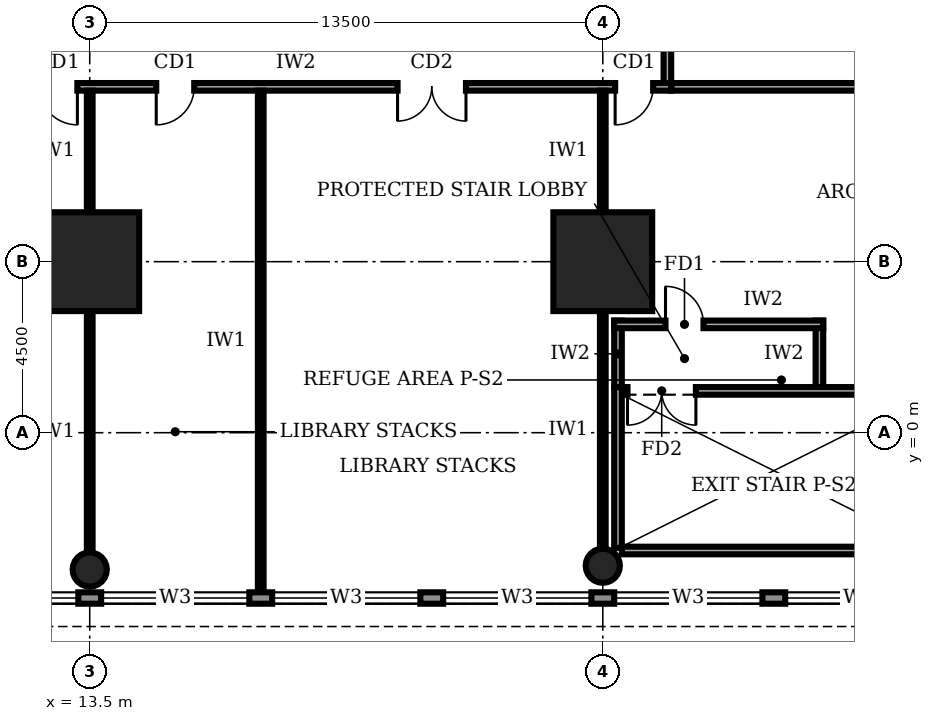
"""IFC4 building model, lengths in metres.
Left out: names, types, materials, properties, quantities, classifications, styles, units other than length and angle.
Written with IfcOpenShell. Run it as: python <this file> out.ifc"""

import sys

from ifc_helpers import new_model, si_unit, direction, frame, frame_2d, origin, origin_2d, place, context, subcontext, project, spatial, rectangle, circle, extrude, element, fill, save


model = new_model("IFC4")
c1 = context("Model", 3, precision=1e-05, world=origin(), true_north=direction((0.0, 1.0)))
c2 = subcontext(c1, "Body", "Model", "MODEL_VIEW")
j1 = project(units=[si_unit("LENGTHUNIT", "METRE"), si_unit("PLANEANGLEUNIT", "RADIAN")], contexts=[c1])
p1 = place(None, origin())
s1 = spatial("IfcSite", under=j1, at=p1, CompositionType="ELEMENT")
p2 = place(p1, origin())
s2 = spatial("IfcBuilding", under=s1, at=p2, CompositionType="ELEMENT")
p3 = place(p2, frame((0.0, 0.0, 16.0)))
s3 = spatial("IfcBuildingStorey", under=s2, at=p3, CompositionType="ELEMENT", Elevation=16.0)
for number, where, z_axis, x_axis in (
    (1, (13.5, 4.5, 0.0), (0.0, 0.0, 1.0), (1.0, 0.0, 0.0)),
    (2, (27.0, 4.5, 0.0), (0.0, 0.0, 1.0), (1.0, 0.0, 0.0)),
):
    element("IfcColumn", number, at=place(p3, frame(where, z_axis=z_axis, x_axis=x_axis)), inside=s3, PredefinedType="COLUMN", context=c2, shape_type="SweptSolid", body=[
        extrude(rectangle(XDim=2.6, YDim=2.6, at=origin_2d()), origin(), (0.0, 0.0, 1.0), 5.0),
    ])
for number, where, z_axis, x_axis in (
    (3, (13.5, -3.6, 0.0), (0.0, 0.0, 1.0), (1.0, 0.0, 0.0)),
    (4, (27.0, -3.5, 0.0), (0.0, 0.0, 1.0), (1.0, 0.0, 0.0)),
):
    element("IfcColumn", number, at=place(p3, frame(where, z_axis=z_axis, x_axis=x_axis)), inside=s3, PredefinedType="COLUMN", context=c2, shape_type="SweptSolid", body=[
        extrude(circle(Radius=0.45, at=origin_2d()), origin(), (0.0, 0.0, 1.0), 5.0),
    ])
p4 = place(p3, frame((0.02, -4.35, 0.0), z_axis=(0.0, 0.0, 1.0), x_axis=(1.0, 0.0, 0.0)))
e5 = element("IfcWall", 5, at=p4, inside=s3, PredefinedType="STANDARD", context=c2, shape_type="SweptSolid", body=[
    extrude(rectangle(XDim=98.96, YDim=0.3, at=frame_2d((49.48, 0.0))), origin(), (0.0, 0.0, 1.0), 4.7),
])
p5 = place(p4, frame((4.78, 0.0, 0.95)))
e6 = element("IfcOpeningElement", 6, at=p5, cuts=e5, PredefinedType="OPENING", context=c2, shape_type="SweptSolid", body=[
    extrude(rectangle(XDim=3.9, YDim=1.8, at=frame_2d((1.95, 0.9))), frame((0.0, 0.16, 0.0), z_axis=(0.0, -1.0, 0.0), x_axis=(1.0, 0.0, 0.0)), (0.0, 0.0, 1.0), 0.32),
])
p6 = place(p4, frame((9.28, 0.0, 0.95)))
e7 = element("IfcOpeningElement", 7, at=p6, cuts=e5, PredefinedType="OPENING", context=c2, shape_type="SweptSolid", body=[
    extrude(rectangle(XDim=3.9, YDim=1.8, at=frame_2d((1.95, 0.9))), frame((0.0, 0.16, 0.0), z_axis=(0.0, -1.0, 0.0), x_axis=(1.0, 0.0, 0.0)), (0.0, 0.0, 1.0), 0.32),
])
p7 = place(p4, frame((13.78, 0.0, 0.95)))
e8 = element("IfcOpeningElement", 8, at=p7, cuts=e5, PredefinedType="OPENING", context=c2, shape_type="SweptSolid", body=[
    extrude(rectangle(XDim=3.9, YDim=1.8, at=frame_2d((1.95, 0.9))), frame((0.0, 0.16, 0.0), z_axis=(0.0, -1.0, 0.0), x_axis=(1.0, 0.0, 0.0)), (0.0, 0.0, 1.0), 0.32),
])
p8 = place(p4, frame((18.28, 0.0, 0.95)))
e9 = element("IfcOpeningElement", 9, at=p8, cuts=e5, PredefinedType="OPENING", context=c2, shape_type="SweptSolid", body=[
    extrude(rectangle(XDim=3.9, YDim=1.8, at=frame_2d((1.95, 0.9))), frame((0.0, 0.16, 0.0), z_axis=(0.0, -1.0, 0.0), x_axis=(1.0, 0.0, 0.0)), (0.0, 0.0, 1.0), 0.32),
])
p9 = place(p4, frame((22.78, 0.0, 0.95)))
e10 = element("IfcOpeningElement", 10, at=p9, cuts=e5, PredefinedType="OPENING", context=c2, shape_type="SweptSolid", body=[
    extrude(rectangle(XDim=3.9, YDim=1.8, at=frame_2d((1.95, 0.9))), frame((0.0, 0.16, 0.0), z_axis=(0.0, -1.0, 0.0), x_axis=(1.0, 0.0, 0.0)), (0.0, 0.0, 1.0), 0.32),
])
p10 = place(p4, frame((27.28, 0.0, 0.95)))
e11 = element("IfcOpeningElement", 11, at=p10, cuts=e5, PredefinedType="OPENING", context=c2, shape_type="SweptSolid", body=[
    extrude(rectangle(XDim=3.9, YDim=1.8, at=frame_2d((1.95, 0.9))), frame((0.0, 0.16, 0.0), z_axis=(0.0, -1.0, 0.0), x_axis=(1.0, 0.0, 0.0)), (0.0, 0.0, 1.0), 0.32),
])
p11 = place(p4, frame((31.78, 0.0, 0.95)))
e12 = element("IfcOpeningElement", 12, at=p11, cuts=e5, PredefinedType="OPENING", context=c2, shape_type="SweptSolid", body=[
    extrude(rectangle(XDim=3.9, YDim=1.8, at=frame_2d((1.95, 0.9))), frame((0.0, 0.16, 0.0), z_axis=(0.0, -1.0, 0.0), x_axis=(1.0, 0.0, 0.0)), (0.0, 0.0, 1.0), 0.32),
])
p12 = place(p4, frame((36.28, 0.0, 0.95)))
e13 = element("IfcOpeningElement", 13, at=p12, cuts=e5, PredefinedType="OPENING", context=c2, shape_type="SweptSolid", body=[
    extrude(rectangle(XDim=3.9, YDim=1.8, at=frame_2d((1.95, 0.9))), frame((0.0, 0.16, 0.0), z_axis=(0.0, -1.0, 0.0), x_axis=(1.0, 0.0, 0.0)), (0.0, 0.0, 1.0), 0.32),
])
p13 = place(p4, frame((40.78, 0.0, 0.95)))
e14 = element("IfcOpeningElement", 14, at=p13, cuts=e5, PredefinedType="OPENING", context=c2, shape_type="SweptSolid", body=[
    extrude(rectangle(XDim=3.9, YDim=1.8, at=frame_2d((1.95, 0.9))), frame((0.0, 0.16, 0.0), z_axis=(0.0, -1.0, 0.0), x_axis=(1.0, 0.0, 0.0)), (0.0, 0.0, 1.0), 0.32),
])
p14 = place(p4, frame((45.28, 0.0, 0.95)))
e15 = element("IfcOpeningElement", 15, at=p14, cuts=e5, PredefinedType="OPENING", context=c2, shape_type="SweptSolid", body=[
    extrude(rectangle(XDim=3.9, YDim=1.8, at=frame_2d((1.95, 0.9))), frame((0.0, 0.16, 0.0), z_axis=(0.0, -1.0, 0.0), x_axis=(1.0, 0.0, 0.0)), (0.0, 0.0, 1.0), 0.32),
])
p15 = place(p4, frame((49.78, 0.0, 0.95)))
e16 = element("IfcOpeningElement", 16, at=p15, cuts=e5, PredefinedType="OPENING", context=c2, shape_type="SweptSolid", body=[
    extrude(rectangle(XDim=3.9, YDim=1.8, at=frame_2d((1.95, 0.9))), frame((0.0, 0.16, 0.0), z_axis=(0.0, -1.0, 0.0), x_axis=(1.0, 0.0, 0.0)), (0.0, 0.0, 1.0), 0.32),
])
p16 = place(p4, frame((54.28, 0.0, 0.95)))
e17 = element("IfcOpeningElement", 17, at=p16, cuts=e5, PredefinedType="OPENING", context=c2, shape_type="SweptSolid", body=[
    extrude(rectangle(XDim=3.9, YDim=1.8, at=frame_2d((1.95, 0.9))), frame((0.0, 0.16, 0.0), z_axis=(0.0, -1.0, 0.0), x_axis=(1.0, 0.0, 0.0)), (0.0, 0.0, 1.0), 0.32),
])
p17 = place(p4, frame((58.78, 0.0, 0.95)))
e18 = element("IfcOpeningElement", 18, at=p17, cuts=e5, PredefinedType="OPENING", context=c2, shape_type="SweptSolid", body=[
    extrude(rectangle(XDim=3.9, YDim=1.8, at=frame_2d((1.95, 0.9))), frame((0.0, 0.16, 0.0), z_axis=(0.0, -1.0, 0.0), x_axis=(1.0, 0.0, 0.0)), (0.0, 0.0, 1.0), 0.32),
])
p18 = place(p4, frame((63.28, 0.0, 0.95)))
e19 = element("IfcOpeningElement", 19, at=p18, cuts=e5, PredefinedType="OPENING", context=c2, shape_type="SweptSolid", body=[
    extrude(rectangle(XDim=3.9, YDim=1.8, at=frame_2d((1.95, 0.9))), frame((0.0, 0.16, 0.0), z_axis=(0.0, -1.0, 0.0), x_axis=(1.0, 0.0, 0.0)), (0.0, 0.0, 1.0), 0.32),
])
p19 = place(p4, frame((67.78, 0.0, 0.95)))
e20 = element("IfcOpeningElement", 20, at=p19, cuts=e5, PredefinedType="OPENING", context=c2, shape_type="SweptSolid", body=[
    extrude(rectangle(XDim=3.9, YDim=1.8, at=frame_2d((1.95, 0.9))), frame((0.0, 0.16, 0.0), z_axis=(0.0, -1.0, 0.0), x_axis=(1.0, 0.0, 0.0)), (0.0, 0.0, 1.0), 0.32),
])
p20 = place(p4, frame((72.28, 0.0, 0.95)))
e21 = element("IfcOpeningElement", 21, at=p20, cuts=e5, PredefinedType="OPENING", context=c2, shape_type="SweptSolid", body=[
    extrude(rectangle(XDim=3.9, YDim=1.8, at=frame_2d((1.95, 0.9))), frame((0.0, 0.16, 0.0), z_axis=(0.0, -1.0, 0.0), x_axis=(1.0, 0.0, 0.0)), (0.0, 0.0, 1.0), 0.32),
])
p21 = place(p4, frame((76.78, 0.0, 0.95)))
e22 = element("IfcOpeningElement", 22, at=p21, cuts=e5, PredefinedType="OPENING", context=c2, shape_type="SweptSolid", body=[
    extrude(rectangle(XDim=3.9, YDim=1.8, at=frame_2d((1.95, 0.9))), frame((0.0, 0.16, 0.0), z_axis=(0.0, -1.0, 0.0), x_axis=(1.0, 0.0, 0.0)), (0.0, 0.0, 1.0), 0.32),
])
p22 = place(p4, frame((81.28, 0.0, 0.95)))
e23 = element("IfcOpeningElement", 23, at=p22, cuts=e5, PredefinedType="OPENING", context=c2, shape_type="SweptSolid", body=[
    extrude(rectangle(XDim=3.9, YDim=1.8, at=frame_2d((1.95, 0.9))), frame((0.0, 0.16, 0.0), z_axis=(0.0, -1.0, 0.0), x_axis=(1.0, 0.0, 0.0)), (0.0, 0.0, 1.0), 0.32),
])
p23 = place(p4, frame((85.78, 0.0, 0.95)))
e24 = element("IfcOpeningElement", 24, at=p23, cuts=e5, PredefinedType="OPENING", context=c2, shape_type="SweptSolid", body=[
    extrude(rectangle(XDim=3.9, YDim=1.8, at=frame_2d((1.95, 0.9))), frame((0.0, 0.16, 0.0), z_axis=(0.0, -1.0, 0.0), x_axis=(1.0, 0.0, 0.0)), (0.0, 0.0, 1.0), 0.32),
])
p24 = place(p4, frame((90.28, 0.0, 0.95)))
e25 = element("IfcOpeningElement", 25, at=p24, cuts=e5, PredefinedType="OPENING", context=c2, shape_type="SweptSolid", body=[
    extrude(rectangle(XDim=3.9, YDim=1.8, at=frame_2d((1.95, 0.9))), frame((0.0, 0.16, 0.0), z_axis=(0.0, -1.0, 0.0), x_axis=(1.0, 0.0, 0.0)), (0.0, 0.0, 1.0), 0.32),
])
p25 = place(p4, frame((94.78, 0.0, 0.95)))
e26 = element("IfcOpeningElement", 26, at=p25, cuts=e5, PredefinedType="OPENING", context=c2, shape_type="SweptSolid", body=[
    extrude(rectangle(XDim=3.9, YDim=1.8, at=frame_2d((1.95, 0.9))), frame((0.0, 0.16, 0.0), z_axis=(0.0, -1.0, 0.0), x_axis=(1.0, 0.0, 0.0)), (0.0, 0.0, 1.0), 0.32),
])
p26 = place(p3, frame((11.9, 9.1, 0.0), z_axis=(0.0, 0.0, 1.0), x_axis=(1.0, 0.0, 0.0)))
e27 = element("IfcWall", 27, at=p26, inside=s3, PredefinedType="SOLIDWALL", context=c2, shape_type="SweptSolid", body=[
    extrude(rectangle(XDim=16.9, YDim=0.2, at=frame_2d((8.45, 0.0))), origin(), (0.0, 0.0, 1.0), 4.7),
])
p27 = place(p26, frame((0.275, 0.0, 0.0)))
e28 = element("IfcOpeningElement", 28, at=p27, cuts=e27, PredefinedType="OPENING", context=c2, shape_type="SweptSolid", body=[
    extrude(rectangle(XDim=1.0, YDim=2.1, at=frame_2d((0.5, 1.05))), frame((0.0, 0.11, 0.0), z_axis=(0.0, -1.0, 0.0), x_axis=(1.0, 0.0, 0.0)), (0.0, 0.0, 1.0), 0.22),
])
p28 = place(p26, frame((3.35, 0.0, 0.0)))
e29 = element("IfcOpeningElement", 29, at=p28, cuts=e27, PredefinedType="OPENING", context=c2, shape_type="SweptSolid", body=[
    extrude(rectangle(XDim=1.0, YDim=2.1, at=frame_2d((0.5, 1.05))), frame((0.0, 0.11, 0.0), z_axis=(0.0, -1.0, 0.0), x_axis=(1.0, 0.0, 0.0)), (0.0, 0.0, 1.0), 0.22),
])
p29 = place(p26, frame((9.7, 0.0, 0.0)))
e30 = element("IfcOpeningElement", 30, at=p29, cuts=e27, PredefinedType="OPENING", context=c2, shape_type="SweptSolid", body=[
    extrude(rectangle(XDim=1.8, YDim=2.1, at=frame_2d((0.9, 1.05))), frame((0.0, 0.11, 0.0), z_axis=(0.0, -1.0, 0.0), x_axis=(1.0, 0.0, 0.0)), (0.0, 0.0, 1.0), 0.22),
])
p30 = place(p26, frame((15.425, 0.0, 0.0)))
e31 = element("IfcOpeningElement", 31, at=p30, cuts=e27, PredefinedType="OPENING", context=c2, shape_type="SweptSolid", body=[
    extrude(rectangle(XDim=1.0, YDim=2.1, at=frame_2d((0.5, 1.05))), frame((0.0, 0.11, 0.0), z_axis=(0.0, -1.0, 0.0), x_axis=(1.0, 0.0, 0.0)), (0.0, 0.0, 1.0), 0.22),
])
p31 = place(p3, frame((28.7, 9.2, 0.0), z_axis=(0.0, 0.0, 1.0), x_axis=(0.0, 1.0, 0.0)))
e32 = element("IfcWall", 32, at=p31, inside=s3, PredefinedType="SOLIDWALL", context=c2, shape_type="SweptSolid", body=[
    extrude(rectangle(XDim=22.3, YDim=0.2, at=frame_2d((11.15, 0.0))), origin(), (0.0, 0.0, 1.0), 4.7),
])
p32 = place(p31, frame((3.4, 0.0, 0.0)))
e33 = element("IfcOpeningElement", 33, at=p32, cuts=e32, PredefinedType="OPENING", context=c2, shape_type="SweptSolid", body=[
    extrude(rectangle(XDim=1.8, YDim=2.1, at=frame_2d((0.9, 1.05))), frame((0.0, 0.11, 0.0), z_axis=(0.0, -1.0, 0.0), x_axis=(1.0, 0.0, 0.0)), (0.0, 0.0, 1.0), 0.22),
])
p33 = place(p31, frame((14.65, 0.0, 0.0)))
e34 = element("IfcOpeningElement", 34, at=p33, cuts=e32, PredefinedType="OPENING", context=c2, shape_type="SweptSolid", body=[
    extrude(rectangle(XDim=1.8, YDim=2.1, at=frame_2d((0.9, 1.05))), frame((0.0, 0.11, 0.0), z_axis=(0.0, -1.0, 0.0), x_axis=(1.0, 0.0, 0.0)), (0.0, 0.0, 1.0), 0.22),
])
p34 = place(p3, frame((28.8, 9.1, 0.0), z_axis=(0.0, 0.0, 1.0), x_axis=(1.0, 0.0, 0.0)))
e35 = element("IfcWall", 35, at=p34, inside=s3, PredefinedType="SOLIDWALL", context=c2, shape_type="SweptSolid", body=[
    extrude(rectangle(XDim=11.52, YDim=0.2, at=frame_2d((5.76, 0.0))), origin(), (0.0, 0.0, 1.0), 4.7),
])
p35 = place(p3, frame((13.5, -3.13, 0.0), z_axis=(0.0, 0.0, 1.0), x_axis=(0.0, 1.0, 0.0)))
e36 = element("IfcWall", 36, at=p35, inside=s3, PredefinedType="PARTITIONING", context=c2, shape_type="SweptSolid", body=[
    extrude(rectangle(XDim=6.31, YDim=0.15, at=frame_2d((3.155, 0.0))), origin(), (0.0, 0.0, 1.0), 3.7),
])
p36 = place(p3, frame((13.5, 5.82, 0.0), z_axis=(0.0, 0.0, 1.0), x_axis=(0.0, 1.0, 0.0)))
e37 = element("IfcWall", 37, at=p36, inside=s3, PredefinedType="PARTITIONING", context=c2, shape_type="SweptSolid", body=[
    extrude(rectangle(XDim=3.18, YDim=0.15, at=frame_2d((1.59, 0.0))), origin(), (0.0, 0.0, 1.0), 3.8),
])
p37 = place(p3, frame((18.0, -4.2, 0.0), z_axis=(0.0, 0.0, 1.0), x_axis=(0.0, 1.0, 0.0)))
e38 = element("IfcWall", 38, at=p37, inside=s3, PredefinedType="PARTITIONING", context=c2, shape_type="SweptSolid", body=[
    extrude(rectangle(XDim=13.2, YDim=0.15, at=frame_2d((6.6, 0.0))), origin(), (0.0, 0.0, 1.0), 4.7),
])
p38 = place(p3, frame((27.0, -3.03, 0.0), z_axis=(0.0, 0.0, 1.0), x_axis=(0.0, 1.0, 0.0)))
e39 = element("IfcWall", 39, at=p38, inside=s3, PredefinedType="PARTITIONING", context=c2, shape_type="SweptSolid", body=[
    extrude(rectangle(XDim=6.21, YDim=0.15, at=frame_2d((3.105, 0.0))), origin(), (0.0, 0.0, 1.0), 3.7),
])
p39 = place(p3, frame((27.0, 5.82, 0.0), z_axis=(0.0, 0.0, 1.0), x_axis=(0.0, 1.0, 0.0)))
e40 = element("IfcWall", 40, at=p39, inside=s3, PredefinedType="PARTITIONING", context=c2, shape_type="SweptSolid", body=[
    extrude(rectangle(XDim=3.18, YDim=0.15, at=frame_2d((1.59, 0.0))), origin(), (0.0, 0.0, 1.0), 3.8),
])
p40 = place(p3, frame((27.5, 1.1, 0.0), z_axis=(0.0, 0.0, 1.0), x_axis=(1.0, 0.0, 0.0)))
e41 = element("IfcWall", 41, at=p40, inside=s3, PredefinedType="SOLIDWALL", context=c2, shape_type="SweptSolid", body=[
    extrude(rectangle(XDim=8.0, YDim=0.2, at=frame_2d((4.0, 0.0))), origin(), (0.0, 0.0, 1.0), 4.7),
])
p41 = place(p40, frame((0.15, 0.0, 0.0)))
e42 = element("IfcOpeningElement", 42, at=p41, cuts=e41, PredefinedType="OPENING", context=c2, shape_type="SweptSolid", body=[
    extrude(rectangle(XDim=1.8, YDim=2.1, at=frame_2d((0.9, 1.05))), frame((0.0, 0.11, 0.0), z_axis=(0.0, -1.0, 0.0), x_axis=(1.0, 0.0, 0.0)), (0.0, 0.0, 1.0), 0.22),
])
p42 = place(p3, frame((27.5, -3.1, 0.0), z_axis=(0.0, 0.0, 1.0), x_axis=(1.0, 0.0, 0.0)))
e43 = element("IfcWall", 43, at=p42, inside=s3, PredefinedType="SOLIDWALL", context=c2, shape_type="SweptSolid", body=[
    extrude(rectangle(XDim=8.0, YDim=0.2, at=frame_2d((4.0, 0.0))), origin(), (0.0, 0.0, 1.0), 4.7),
])
p43 = place(p3, frame((27.4, -3.03, 0.0), z_axis=(0.0, 0.0, 1.0), x_axis=(0.0, 1.0, 0.0)))
e44 = element("IfcWall", 44, at=p43, inside=s3, PredefinedType="SOLIDWALL", context=c2, shape_type="SweptSolid", body=[
    extrude(rectangle(XDim=4.23, YDim=0.2, at=frame_2d((2.115, 0.0))), origin(), (0.0, 0.0, 1.0), 4.7),
])
p44 = place(p3, frame((27.4, 1.2, 0.0), z_axis=(0.0, 0.0, 1.0), x_axis=(0.0, 1.0, 0.0)))
e45 = element("IfcWall", 45, at=p44, inside=s3, PredefinedType="SOLIDWALL", context=c2, shape_type="SweptSolid", body=[
    extrude(rectangle(XDim=1.75, YDim=0.2, at=frame_2d((0.875, 0.0))), origin(), (0.0, 0.0, 1.0), 3.7),
])
p45 = place(p3, frame((32.7, 1.2, 0.0), z_axis=(0.0, 0.0, 1.0), x_axis=(0.0, 1.0, 0.0)))
e46 = element("IfcWall", 46, at=p45, inside=s3, PredefinedType="SOLIDWALL", context=c2, shape_type="SweptSolid", body=[
    extrude(rectangle(XDim=1.75, YDim=0.2, at=frame_2d((0.875, 0.0))), origin(), (0.0, 0.0, 1.0), 4.7),
])
p46 = place(p3, frame((27.3, 2.85, 0.0), z_axis=(0.0, 0.0, 1.0), x_axis=(1.0, 0.0, 0.0)))
e47 = element("IfcWall", 47, at=p46, inside=s3, PredefinedType="SOLIDWALL", context=c2, shape_type="SweptSolid", body=[
    extrude(rectangle(XDim=5.5, YDim=0.2, at=frame_2d((2.75, 0.0))), origin(), (0.0, 0.0, 1.0), 4.7),
])
p47 = place(p46, frame((1.35, 0.0, 0.0)))
e48 = element("IfcOpeningElement", 48, at=p47, cuts=e47, PredefinedType="OPENING", context=c2, shape_type="SweptSolid", body=[
    extrude(rectangle(XDim=1.0, YDim=2.1, at=frame_2d((0.5, 1.05))), frame((0.0, 0.11, 0.0), z_axis=(0.0, -1.0, 0.0), x_axis=(1.0, 0.0, 0.0)), (0.0, 0.0, 1.0), 0.22),
])
p48 = place(p6, origin())
e49 = element("IfcWindow", 49, at=p48, inside=s3, PartitioningType="SINGLE_PANEL", PredefinedType="WINDOW", context=c2, shape_type="SweptSolid", body=[
    extrude(rectangle(XDim=3.9, YDim=1.8, at=frame_2d((1.95, 0.9))), frame((0.0, 0.03, 0.0), z_axis=(0.0, -1.0, 0.0), x_axis=(1.0, 0.0, 0.0)), (0.0, 0.0, 1.0), 0.06),
])
fill(e7, e49)
p49 = place(p7, origin())
e50 = element("IfcWindow", 50, at=p49, inside=s3, PartitioningType="SINGLE_PANEL", PredefinedType="WINDOW", context=c2, shape_type="SweptSolid", body=[
    extrude(rectangle(XDim=3.9, YDim=1.8, at=frame_2d((1.95, 0.9))), frame((0.0, 0.03, 0.0), z_axis=(0.0, -1.0, 0.0), x_axis=(1.0, 0.0, 0.0)), (0.0, 0.0, 1.0), 0.06),
])
fill(e8, e50)
p50 = place(p8, origin())
e51 = element("IfcWindow", 51, at=p50, inside=s3, PartitioningType="SINGLE_PANEL", PredefinedType="WINDOW", context=c2, shape_type="SweptSolid", body=[
    extrude(rectangle(XDim=3.9, YDim=1.8, at=frame_2d((1.95, 0.9))), frame((0.0, 0.03, 0.0), z_axis=(0.0, -1.0, 0.0), x_axis=(1.0, 0.0, 0.0)), (0.0, 0.0, 1.0), 0.06),
])
fill(e9, e51)
p51 = place(p9, origin())
e52 = element("IfcWindow", 52, at=p51, inside=s3, PartitioningType="SINGLE_PANEL", PredefinedType="WINDOW", context=c2, shape_type="SweptSolid", body=[
    extrude(rectangle(XDim=3.9, YDim=1.8, at=frame_2d((1.95, 0.9))), frame((0.0, 0.03, 0.0), z_axis=(0.0, -1.0, 0.0), x_axis=(1.0, 0.0, 0.0)), (0.0, 0.0, 1.0), 0.06),
])
fill(e10, e52)
p52 = place(p10, origin())
e53 = element("IfcWindow", 53, at=p52, inside=s3, PartitioningType="SINGLE_PANEL", PredefinedType="WINDOW", context=c2, shape_type="SweptSolid", body=[
    extrude(rectangle(XDim=3.9, YDim=1.8, at=frame_2d((1.95, 0.9))), frame((0.0, 0.03, 0.0), z_axis=(0.0, -1.0, 0.0), x_axis=(1.0, 0.0, 0.0)), (0.0, 0.0, 1.0), 0.06),
])
fill(e11, e53)
p53 = place(p11, origin())
e54 = element("IfcWindow", 54, at=p53, inside=s3, PartitioningType="SINGLE_PANEL", PredefinedType="WINDOW", context=c2, shape_type="SweptSolid", body=[
    extrude(rectangle(XDim=3.9, YDim=1.8, at=frame_2d((1.95, 0.9))), frame((0.0, 0.03, 0.0), z_axis=(0.0, -1.0, 0.0), x_axis=(1.0, 0.0, 0.0)), (0.0, 0.0, 1.0), 0.06),
])
fill(e12, e54)
p54 = place(p27, frame((1.0, 0.0, 0.0), z_axis=(0.0, 0.0, 1.0), x_axis=(-1.0, 0.0, 0.0)))
e55 = element("IfcDoor", 55, at=p54, inside=s3, OperationType="SINGLE_SWING_LEFT", PredefinedType="DOOR", context=c2, shape_type="SweptSolid", body=[
    extrude(rectangle(XDim=1.0, YDim=2.1, at=frame_2d((0.5, 1.05))), frame((0.0, 0.025, 0.0), z_axis=(0.0, -1.0, 0.0), x_axis=(1.0, 0.0, 0.0)), (0.0, 0.0, 1.0), 0.05),
])
fill(e28, e55)
p55 = place(p28, frame((1.0, 0.0, 0.0), z_axis=(0.0, 0.0, 1.0), x_axis=(-1.0, 0.0, 0.0)))
e56 = element("IfcDoor", 56, at=p55, inside=s3, OperationType="SINGLE_SWING_RIGHT", PredefinedType="DOOR", context=c2, shape_type="SweptSolid", body=[
    extrude(rectangle(XDim=1.0, YDim=2.1, at=frame_2d((0.5, 1.05))), frame((0.0, 0.025, 0.0), z_axis=(0.0, -1.0, 0.0), x_axis=(1.0, 0.0, 0.0)), (0.0, 0.0, 1.0), 0.05),
])
fill(e29, e56)
p56 = place(p29, frame((1.8, 0.0, 0.0), z_axis=(0.0, 0.0, 1.0), x_axis=(-1.0, 0.0, 0.0)))
e57 = element("IfcDoor", 57, at=p56, inside=s3, OperationType="DOUBLE_DOOR_SINGLE_SWING", PredefinedType="DOOR", context=c2, shape_type="SweptSolid", body=[
    extrude(rectangle(XDim=1.8, YDim=2.1, at=frame_2d((0.9, 1.05))), frame((0.0, 0.025, 0.0), z_axis=(0.0, -1.0, 0.0), x_axis=(1.0, 0.0, 0.0)), (0.0, 0.0, 1.0), 0.05),
])
fill(e30, e57)
p57 = place(p30, frame((1.0, 0.0, 0.0), z_axis=(0.0, 0.0, 1.0), x_axis=(-1.0, 0.0, 0.0)))
e58 = element("IfcDoor", 58, at=p57, inside=s3, OperationType="SINGLE_SWING_RIGHT", PredefinedType="DOOR", context=c2, shape_type="SweptSolid", body=[
    extrude(rectangle(XDim=1.0, YDim=2.1, at=frame_2d((0.5, 1.05))), frame((0.0, 0.025, 0.0), z_axis=(0.0, -1.0, 0.0), x_axis=(1.0, 0.0, 0.0)), (0.0, 0.0, 1.0), 0.05),
])
fill(e31, e58)
p58 = place(p41, frame((1.8, 0.0, 0.0), z_axis=(0.0, 0.0, 1.0), x_axis=(-1.0, 0.0, 0.0)))
e59 = element("IfcDoor", 59, at=p58, inside=s3, OperationType="DOUBLE_DOOR_SINGLE_SWING", PredefinedType="DOOR", context=c2, shape_type="SweptSolid", body=[
    extrude(rectangle(XDim=1.8, YDim=2.1, at=frame_2d((0.9, 1.05))), frame((0.0, 0.025, 0.0), z_axis=(0.0, -1.0, 0.0), x_axis=(1.0, 0.0, 0.0)), (0.0, 0.0, 1.0), 0.05),
])
fill(e42, e59)
p59 = place(p47, origin())
e60 = element("IfcDoor", 60, at=p59, inside=s3, OperationType="SINGLE_SWING_LEFT", PredefinedType="DOOR", context=c2, shape_type="SweptSolid", body=[
    extrude(rectangle(XDim=1.0, YDim=2.1, at=frame_2d((0.5, 1.05))), frame((0.0, 0.025, 0.0), z_axis=(0.0, -1.0, 0.0), x_axis=(1.0, 0.0, 0.0)), (0.0, 0.0, 1.0), 0.05),
])
fill(e48, e60)
save(model, sys.argv[1])
